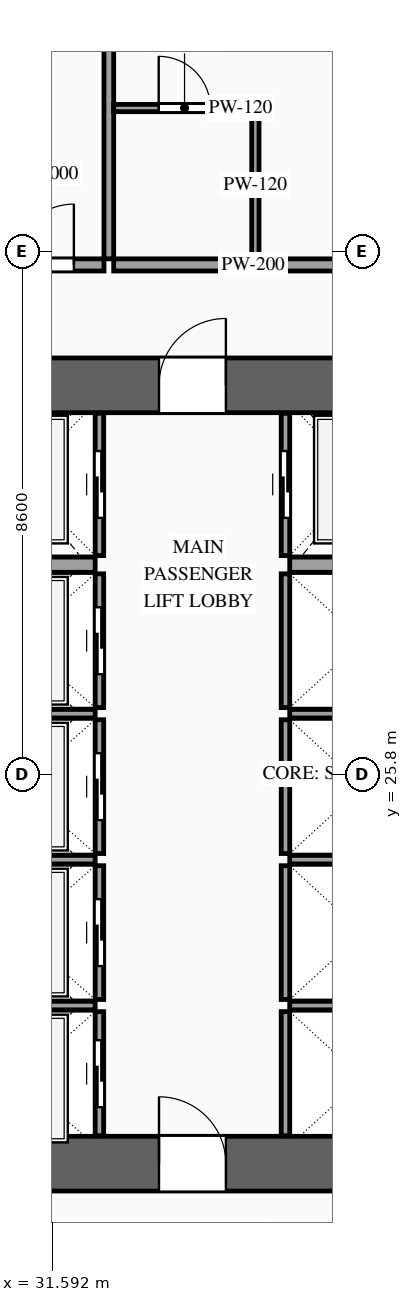
"""IFC4 building model, lengths in metres.
Left out: names, types, materials, properties, quantities, classifications, styles, units other than length and angle.
Written with IfcOpenShell. Run it as: python <this file> out.ifc"""

import sys

from ifc_helpers import new_model, si_unit, direction, frame, frame_2d, origin, place, context, subcontext, project, spatial, rectangle, extrude, source, transform, mapped, element, fill, save


model = new_model("IFC4")
c1 = context("Model", 3, precision=1e-05, world=origin(), true_north=direction((0.0, 1.0)))
c2 = subcontext(c1, "Body", "Model", "MODEL_VIEW")
j1 = project(units=[si_unit("LENGTHUNIT", "METRE"), si_unit("PLANEANGLEUNIT", "RADIAN")], contexts=[c1])
p1 = place(None, origin())
s1 = spatial("IfcSite", under=j1, at=p1, CompositionType="ELEMENT")
p2 = place(p1, origin())
s2 = spatial("IfcBuilding", under=s1, at=p2, CompositionType="ELEMENT")
p3 = place(p2, frame((0.0, 0.0, 53.2)))
s3 = spatial("IfcBuildingStorey", under=s2, at=p3, CompositionType="ELEMENT", Elevation=53.2)
p4 = place(p3, frame((23.35, 19.4, 0.0), z_axis=(0.0, 0.0, 1.0), x_axis=(1.0, 0.0, 0.0)))
e1 = element("IfcWall", 1, at=p4, inside=s3, PredefinedType="SHEAR", context=c2, shape_type="SweptSolid", body=[
    extrude(rectangle(XDim=27.3, YDim=0.9, at=frame_2d((13.65, 0.0))), origin(), (0.0, 0.0, 1.0), 3.6),
])
p5 = place(p4, frame((2.1, 0.0, 0.0)))
e2 = element("IfcOpeningElement", 2, at=p5, cuts=e1, PredefinedType="OPENING", context=c2, shape_type="SweptSolid", body=[
    extrude(rectangle(XDim=1.1, YDim=2.2, at=frame_2d((0.55, 1.1))), frame((0.0, 0.465, 0.0), z_axis=(0.0, -1.0, 0.0), x_axis=(1.0, 0.0, 0.0)), (0.0, 0.0, 1.0), 0.93),
])
p6 = place(p4, frame((10.0, 0.0, 0.0)))
e3 = element("IfcOpeningElement", 3, at=p6, cuts=e1, PredefinedType="OPENING", context=c2, shape_type="SweptSolid", body=[
    extrude(rectangle(XDim=1.1, YDim=2.2, at=frame_2d((0.55, 1.1))), frame((0.0, 0.465, 0.0), z_axis=(0.0, -1.0, 0.0), x_axis=(1.0, 0.0, 0.0)), (0.0, 0.0, 1.0), 0.93),
])
p7 = place(p4, frame((23.2, 0.0, 0.0)))
e4 = element("IfcOpeningElement", 4, at=p7, cuts=e1, PredefinedType="OPENING", context=c2, shape_type="SweptSolid", body=[
    extrude(rectangle(XDim=1.1, YDim=2.2, at=frame_2d((0.55, 1.1))), frame((0.0, 0.465, 0.0), z_axis=(0.0, -1.0, 0.0), x_axis=(1.0, 0.0, 0.0)), (0.0, 0.0, 1.0), 0.93),
])
p8 = place(p4, frame((19.82, 0.0, 0.0)))
e5 = element("IfcOpeningElement", 5, at=p8, cuts=e1, PredefinedType="OPENING", context=c2, shape_type="SweptSolid", body=[
    extrude(rectangle(XDim=0.9, YDim=2.15, at=frame_2d((0.45, 1.075))), frame((0.0, 0.465, 0.0), z_axis=(0.0, -1.0, 0.0), x_axis=(1.0, 0.0, 0.0)), (0.0, 0.0, 1.0), 0.93),
])
p9 = place(p4, frame((18.38, 0.0, 0.0)))
e6 = element("IfcOpeningElement", 6, at=p9, cuts=e1, PredefinedType="OPENING", context=c2, shape_type="SweptSolid", body=[
    extrude(rectangle(XDim=0.9, YDim=2.15, at=frame_2d((0.45, 1.075))), frame((0.0, 0.465, 0.0), z_axis=(0.0, -1.0, 0.0), x_axis=(1.0, 0.0, 0.0)), (0.0, 0.0, 1.0), 0.93),
])
p10 = place(p3, frame((23.35, 32.2, 0.0), z_axis=(0.0, 0.0, 1.0), x_axis=(1.0, 0.0, 0.0)))
e7 = element("IfcWall", 7, at=p10, inside=s3, PredefinedType="SHEAR", context=c2, shape_type="SweptSolid", body=[
    extrude(rectangle(XDim=27.3, YDim=0.9, at=frame_2d((13.65, 0.0))), origin(), (0.0, 0.0, 1.0), 3.6),
])
p11 = place(p10, frame((4.72, 0.0, 0.0)))
e8 = element("IfcOpeningElement", 8, at=p11, cuts=e7, PredefinedType="OPENING", context=c2, shape_type="SweptSolid", body=[
    extrude(rectangle(XDim=0.9, YDim=2.15, at=frame_2d((0.45, 1.075))), frame((0.0, 0.465, 0.0), z_axis=(0.0, -1.0, 0.0), x_axis=(1.0, 0.0, 0.0)), (0.0, 0.0, 1.0), 0.93),
])
p12 = place(p10, frame((10.0, 0.0, 0.0)))
e9 = element("IfcOpeningElement", 9, at=p12, cuts=e7, PredefinedType="OPENING", context=c2, shape_type="SweptSolid", body=[
    extrude(rectangle(XDim=1.1, YDim=2.2, at=frame_2d((0.55, 1.1))), frame((0.0, 0.465, 0.0), z_axis=(0.0, -1.0, 0.0), x_axis=(1.0, 0.0, 0.0)), (0.0, 0.0, 1.0), 0.93),
])
p13 = place(p10, frame((15.85, 0.0, 0.0)))
e10 = element("IfcOpeningElement", 10, at=p13, cuts=e7, PredefinedType="OPENING", context=c2, shape_type="SweptSolid", body=[
    extrude(rectangle(XDim=1.1, YDim=2.2, at=frame_2d((0.55, 1.1))), frame((0.0, 0.465, 0.0), z_axis=(0.0, -1.0, 0.0), x_axis=(1.0, 0.0, 0.0)), (0.0, 0.0, 1.0), 0.93),
])
p14 = place(p10, frame((19.05, 0.0, 0.0)))
e11 = element("IfcOpeningElement", 11, at=p14, cuts=e7, PredefinedType="OPENING", context=c2, shape_type="SweptSolid", body=[
    extrude(rectangle(XDim=0.9, YDim=2.15, at=frame_2d((0.45, 1.075))), frame((0.0, 0.465, 0.0), z_axis=(0.0, -1.0, 0.0), x_axis=(1.0, 0.0, 0.0)), (0.0, 0.0, 1.0), 0.93),
])
p15 = place(p3, frame((32.37, 19.86, 0.0), z_axis=(0.0, 0.0, 1.0), x_axis=(0.0, 1.0, 0.0)))
e12 = element("IfcWall", 12, at=p15, inside=s3, PredefinedType="SOLIDWALL", context=c2, shape_type="SweptSolid", body=[
    extrude(rectangle(XDim=2.04, YDim=0.14, at=frame_2d((1.02, 0.0))), origin(), (0.0, 0.0, 1.0), 3.38),
])
p16 = place(p15, frame((0.47, 0.0, 0.0)))
e13 = element("IfcOpeningElement", 13, at=p16, cuts=e12, PredefinedType="OPENING", context=c2, shape_type="SweptSolid", body=[
    extrude(rectangle(XDim=1.1, YDim=2.2, at=frame_2d((0.55, 1.1))), frame((0.0, 0.085, 0.0), z_axis=(0.0, -1.0, 0.0), x_axis=(1.0, 0.0, 0.0)), (0.0, 0.0, 1.0), 0.17),
])
m1 = source(origin(), c2, "Body", "SweptSolid", [
    extrude(rectangle(XDim=2.5, YDim=0.14, at=frame_2d((1.25, 0.0))), origin(), (0.0, 0.0, 1.0), 3.38),
])
p17 = place(p3, frame((29.8, 22.0, 0.0), z_axis=(0.0, 0.0, 1.0), x_axis=(1.0, 0.0, 0.0)))
e14 = element("IfcWall", 14, at=p17, inside=s3, PredefinedType="SOLIDWALL", context=c2, shape_type="MappedRepresentation", body=[
    mapped(m1, transform((0.0, 0.0, 0.0), scale=1.0)),
])
p18 = place(p3, frame((32.37, 22.1, 0.0), z_axis=(0.0, 0.0, 1.0), x_axis=(0.0, 1.0, 0.0)))
e15 = element("IfcWall", 15, at=p18, inside=s3, PredefinedType="SOLIDWALL", context=c2, shape_type="SweptSolid", body=[
    extrude(rectangle(XDim=2.2, YDim=0.14, at=frame_2d((1.1, 0.0))), origin(), (0.0, 0.0, 1.0), 3.38),
])
p19 = place(p18, frame((0.55, 0.0, 0.0)))
e16 = element("IfcOpeningElement", 16, at=p19, cuts=e15, PredefinedType="OPENING", context=c2, shape_type="SweptSolid", body=[
    extrude(rectangle(XDim=1.1, YDim=2.2, at=frame_2d((0.55, 1.1))), frame((0.0, 0.085, 0.0), z_axis=(0.0, -1.0, 0.0), x_axis=(1.0, 0.0, 0.0)), (0.0, 0.0, 1.0), 0.17),
])
p20 = place(p3, frame((29.8, 24.4, 0.0), z_axis=(0.0, 0.0, 1.0), x_axis=(1.0, 0.0, 0.0)))
e17 = element("IfcWall", 17, at=p20, inside=s3, PredefinedType="SOLIDWALL", context=c2, shape_type="MappedRepresentation", body=[
    mapped(m1, transform((0.0, 0.0, 0.0), scale=1.0)),
])
p21 = place(p3, frame((32.37, 24.5, 0.0), z_axis=(0.0, 0.0, 1.0), x_axis=(0.0, 1.0, 0.0)))
e18 = element("IfcWall", 18, at=p21, inside=s3, PredefinedType="SOLIDWALL", context=c2, shape_type="SweptSolid", body=[
    extrude(rectangle(XDim=2.2, YDim=0.14, at=frame_2d((1.1, 0.0))), origin(), (0.0, 0.0, 1.0), 3.38),
])
p22 = place(p21, frame((0.55, 0.0, 0.0)))
e19 = element("IfcOpeningElement", 19, at=p22, cuts=e18, PredefinedType="OPENING", context=c2, shape_type="SweptSolid", body=[
    extrude(rectangle(XDim=1.1, YDim=2.2, at=frame_2d((0.55, 1.1))), frame((0.0, 0.085, 0.0), z_axis=(0.0, -1.0, 0.0), x_axis=(1.0, 0.0, 0.0)), (0.0, 0.0, 1.0), 0.17),
])
p23 = place(p3, frame((29.8, 26.8, 0.0), z_axis=(0.0, 0.0, 1.0), x_axis=(1.0, 0.0, 0.0)))
e20 = element("IfcWall", 20, at=p23, inside=s3, PredefinedType="SOLIDWALL", context=c2, shape_type="MappedRepresentation", body=[
    mapped(m1, transform((0.0, 0.0, 0.0), scale=1.0)),
])
p24 = place(p3, frame((32.37, 26.9, 0.0), z_axis=(0.0, 0.0, 1.0), x_axis=(0.0, 1.0, 0.0)))
e21 = element("IfcWall", 21, at=p24, inside=s3, PredefinedType="SOLIDWALL", context=c2, shape_type="SweptSolid", body=[
    extrude(rectangle(XDim=2.2, YDim=0.14, at=frame_2d((1.1, 0.0))), origin(), (0.0, 0.0, 1.0), 3.38),
])
p25 = place(p24, frame((0.55, 0.0, 0.0)))
e22 = element("IfcOpeningElement", 22, at=p25, cuts=e21, PredefinedType="OPENING", context=c2, shape_type="SweptSolid", body=[
    extrude(rectangle(XDim=1.1, YDim=2.2, at=frame_2d((0.55, 1.1))), frame((0.0, 0.085, 0.0), z_axis=(0.0, -1.0, 0.0), x_axis=(1.0, 0.0, 0.0)), (0.0, 0.0, 1.0), 0.17),
])
p26 = place(p3, frame((32.37, 29.4, 0.0), z_axis=(0.0, 0.0, 1.0), x_axis=(0.0, 1.0, 0.0)))
e23 = element("IfcWall", 23, at=p26, inside=s3, PredefinedType="SOLIDWALL", context=c2, shape_type="SweptSolid", body=[
    extrude(rectangle(XDim=2.34, YDim=0.14, at=frame_2d((1.17, 0.0))), origin(), (0.0, 0.0, 1.0), 3.38),
])
p27 = place(p26, frame((0.62, 0.0, 0.0)))
e24 = element("IfcOpeningElement", 24, at=p27, cuts=e23, PredefinedType="OPENING", context=c2, shape_type="SweptSolid", body=[
    extrude(rectangle(XDim=1.1, YDim=2.2, at=frame_2d((0.55, 1.1))), frame((0.0, 0.085, 0.0), z_axis=(0.0, -1.0, 0.0), x_axis=(1.0, 0.0, 0.0)), (0.0, 0.0, 1.0), 0.17),
])
m2 = source(origin(), c2, "Body", "SweptSolid", [
    extrude(rectangle(XDim=2.5, YDim=0.25, at=frame_2d((1.25, 0.0))), origin(), (0.0, 0.0, 1.0), 3.38),
])
p28 = place(p3, frame((29.8, 29.25, 0.0), z_axis=(0.0, 0.0, 1.0), x_axis=(1.0, 0.0, 0.0)))
e25 = element("IfcWall", 25, at=p28, inside=s3, PredefinedType="SOLIDWALL", context=c2, shape_type="MappedRepresentation", body=[
    mapped(m2, transform((0.0, 0.0, 0.0), scale=1.0)),
])
m3 = source(origin(), c2, "Body", "SweptSolid", [
    extrude(rectangle(XDim=2.04, YDim=0.14, at=frame_2d((1.02, 0.0))), origin(), (0.0, 0.0, 1.0), 3.38),
])
p29 = place(p3, frame((35.43, 19.86, 0.0), z_axis=(0.0, 0.0, 1.0), x_axis=(0.0, 1.0, 0.0)))
e26 = element("IfcWall", 26, at=p29, inside=s3, PredefinedType="SOLIDWALL", context=c2, shape_type="MappedRepresentation", body=[
    mapped(m3, transform((0.0, 0.0, 0.0), scale=1.0)),
])
m4 = source(origin(), c2, "Body", "SweptSolid", [
    extrude(rectangle(XDim=2.4, YDim=0.14, at=frame_2d((1.2, 0.0))), origin(), (0.0, 0.0, 1.0), 3.38),
])
p30 = place(p3, frame((35.5, 22.0, 0.0), z_axis=(0.0, 0.0, 1.0), x_axis=(1.0, 0.0, 0.0)))
e27 = element("IfcWall", 27, at=p30, inside=s3, PredefinedType="SOLIDWALL", context=c2, shape_type="MappedRepresentation", body=[
    mapped(m4, transform((0.0, 0.0, 0.0), scale=1.0)),
])
m5 = source(origin(), c2, "Body", "SweptSolid", [
    extrude(rectangle(XDim=2.2, YDim=0.14, at=frame_2d((1.1, 0.0))), origin(), (0.0, 0.0, 1.0), 3.38),
])
p31 = place(p3, frame((35.43, 22.1, 0.0), z_axis=(0.0, 0.0, 1.0), x_axis=(0.0, 1.0, 0.0)))
e28 = element("IfcWall", 28, at=p31, inside=s3, PredefinedType="SOLIDWALL", context=c2, shape_type="MappedRepresentation", body=[
    mapped(m5, transform((0.0, 0.0, 0.0), scale=1.0)),
])
p32 = place(p3, frame((35.5, 24.4, 0.0), z_axis=(0.0, 0.0, 1.0), x_axis=(1.0, 0.0, 0.0)))
e29 = element("IfcWall", 29, at=p32, inside=s3, PredefinedType="SOLIDWALL", context=c2, shape_type="MappedRepresentation", body=[
    mapped(m4, transform((0.0, 0.0, 0.0), scale=1.0)),
])
p33 = place(p3, frame((35.43, 24.5, 0.0), z_axis=(0.0, 0.0, 1.0), x_axis=(0.0, 1.0, 0.0)))
e30 = element("IfcWall", 30, at=p33, inside=s3, PredefinedType="SOLIDWALL", context=c2, shape_type="MappedRepresentation", body=[
    mapped(m5, transform((0.0, 0.0, 0.0), scale=1.0)),
])
p34 = place(p3, frame((35.5, 26.8, 0.0), z_axis=(0.0, 0.0, 1.0), x_axis=(1.0, 0.0, 0.0)))
e31 = element("IfcWall", 31, at=p34, inside=s3, PredefinedType="SOLIDWALL", context=c2, shape_type="MappedRepresentation", body=[
    mapped(m4, transform((0.0, 0.0, 0.0), scale=1.0)),
])
m6 = source(origin(), c2, "Body", "SweptSolid", [
    extrude(rectangle(XDim=2.2, YDim=0.14, at=frame_2d((1.1, 0.0))), origin(), (0.0, 0.0, 1.0), 3.38),
])
p35 = place(p3, frame((35.43, 26.9, 0.0), z_axis=(0.0, 0.0, 1.0), x_axis=(0.0, 1.0, 0.0)))
e32 = element("IfcWall", 32, at=p35, inside=s3, PredefinedType="SOLIDWALL", context=c2, shape_type="MappedRepresentation", body=[
    mapped(m6, transform((0.0, 0.0, 0.0), scale=1.0)),
])
p36 = place(p3, frame((35.43, 29.4, 0.0), z_axis=(0.0, 0.0, 1.0), x_axis=(0.0, 1.0, 0.0)))
e33 = element("IfcWall", 33, at=p36, inside=s3, PredefinedType="SOLIDWALL", context=c2, shape_type="SweptSolid", body=[
    extrude(rectangle(XDim=2.34, YDim=0.14, at=frame_2d((1.17, 0.0))), origin(), (0.0, 0.0, 1.0), 3.38),
])
p37 = place(p36, frame((0.62, 0.0, 0.0)))
e34 = element("IfcOpeningElement", 34, at=p37, cuts=e33, PredefinedType="OPENING", context=c2, shape_type="SweptSolid", body=[
    extrude(rectangle(XDim=1.1, YDim=2.2, at=frame_2d((0.55, 1.1))), frame((0.0, 0.085, 0.0), z_axis=(0.0, -1.0, 0.0), x_axis=(1.0, 0.0, 0.0)), (0.0, 0.0, 1.0), 0.17),
])
m7 = source(origin(), c2, "Body", "SweptSolid", [
    extrude(rectangle(XDim=2.4, YDim=0.25, at=frame_2d((1.2, 0.0))), origin(), (0.0, 0.0, 1.0), 3.38),
])
p38 = place(p3, frame((35.5, 29.25, 0.0), z_axis=(0.0, 0.0, 1.0), x_axis=(1.0, 0.0, 0.0)))
e35 = element("IfcWall", 35, at=p38, inside=s3, PredefinedType="SOLIDWALL", context=c2, shape_type="MappedRepresentation", body=[
    mapped(m7, transform((0.0, 0.0, 0.0), scale=1.0)),
])
p39 = place(p3, frame((28.42, 34.18, 0.0), z_axis=(0.0, 0.0, 1.0), x_axis=(1.0, 0.0, 0.0)))
e36 = element("IfcWall", 36, at=p39, inside=s3, PredefinedType="PARTITIONING", context=c2, shape_type="SweptSolid", body=[
    extrude(rectangle(XDim=4.025, YDim=0.2, at=frame_2d((2.013, 0.0))), origin(), (0.0, 0.0, 1.0), 3.38),
])
p40 = place(p39, frame((2.53, 0.0, 0.0)))
e37 = element("IfcOpeningElement", 37, at=p40, cuts=e36, PredefinedType="OPENING", context=c2, shape_type="SweptSolid", body=[
    extrude(rectangle(XDim=1.0, YDim=2.2, at=frame_2d((0.5, 1.1))), frame((0.0, 0.115, 0.0), z_axis=(0.0, -1.0, 0.0), x_axis=(1.0, 0.0, 0.0)), (0.0, 0.0, 1.0), 0.23),
])
m8 = source(origin(), c2, "Body", "SweptSolid", [
    extrude(rectangle(XDim=16.47, YDim=0.16, at=frame_2d((8.235, 0.0))), origin(), (0.0, 0.0, 1.0), 3.38),
])
p41 = place(p3, frame((32.525, 34.28, 0.0), z_axis=(0.0, 0.0, 1.0), x_axis=(0.0, 1.0, 0.0)))
e38 = element("IfcWall", 38, at=p41, inside=s3, PredefinedType="PARTITIONING", context=c2, shape_type="MappedRepresentation", body=[
    mapped(m8, transform((0.0, 0.0, 0.0), scale=1.0)),
])
p42 = place(p3, frame((32.605, 34.18, 0.0), z_axis=(0.0, 0.0, 1.0), x_axis=(1.0, 0.0, 0.0)))
e39 = element("IfcWall", 39, at=p42, inside=s3, PredefinedType="PARTITIONING", context=c2, shape_type="SweptSolid", body=[
    extrude(rectangle(XDim=8.261, YDim=0.2, at=frame_2d((4.13, 0.0))), origin(), (0.0, 0.0, 1.0), 3.38),
])
p43 = place(p42, frame((4.836, 0.0, 0.0)))
e40 = element("IfcOpeningElement", 40, at=p43, cuts=e39, PredefinedType="OPENING", context=c2, shape_type="SweptSolid", body=[
    extrude(rectangle(XDim=1.0, YDim=2.2, at=frame_2d((0.5, 1.1))), frame((0.0, 0.115, 0.0), z_axis=(0.0, -1.0, 0.0), x_axis=(1.0, 0.0, 0.0)), (0.0, 0.0, 1.0), 0.23),
])
p44 = place(p3, frame((32.605, 36.76, 0.0), z_axis=(0.0, 0.0, 1.0), x_axis=(1.0, 0.0, 0.0)))
e41 = element("IfcWall", 41, at=p44, inside=s3, PredefinedType="PARTITIONING", context=c2, shape_type="SweptSolid", body=[
    extrude(rectangle(XDim=2.33, YDim=0.12, at=frame_2d((1.165, 0.0))), origin(), (0.0, 0.0, 1.0), 3.38),
])
p45 = place(p44, frame((0.74, 0.0, 0.0)))
e42 = element("IfcOpeningElement", 42, at=p45, cuts=e41, PredefinedType="OPENING", context=c2, shape_type="SweptSolid", body=[
    extrude(rectangle(XDim=0.85, YDim=2.1, at=frame_2d((0.425, 1.05))), frame((0.0, 0.075, 0.0), z_axis=(0.0, -1.0, 0.0), x_axis=(1.0, 0.0, 0.0)), (0.0, 0.0, 1.0), 0.15),
])
m9 = source(origin(), c2, "Body", "SweptSolid", [
    extrude(rectangle(XDim=2.42, YDim=0.12, at=frame_2d((1.21, 0.0))), origin(), (0.0, 0.0, 1.0), 3.38),
])
p46 = place(p3, frame((34.935, 34.28, 0.0), z_axis=(0.0, 0.0, 1.0), x_axis=(0.0, 1.0, 0.0)))
e43 = element("IfcWall", 43, at=p46, inside=s3, PredefinedType="PARTITIONING", context=c2, shape_type="MappedRepresentation", body=[
    mapped(m9, transform((0.0, 0.0, 0.0), scale=1.0)),
])
m10 = source(origin(), c2, "Body", "SweptSolid", [
    extrude(rectangle(XDim=1.1, YDim=2.2, at=frame_2d((0.55, 1.1))), frame((0.0, 0.025, 0.0), z_axis=(0.0, -1.0, 0.0), x_axis=(1.0, 0.0, 0.0)), (0.0, 0.0, 1.0), 0.05),
])
p47 = place(p16, origin())
e44 = element("IfcDoor", 44, at=p47, inside=s3, OperationType="SLIDING_TO_LEFT", PredefinedType="DOOR", context=c2, shape_type="MappedRepresentation", body=[
    mapped(m10, transform((0.0, 0.0, 0.0), scale=1.0)),
])
fill(e13, e44)
p48 = place(p19, origin())
e45 = element("IfcDoor", 45, at=p48, inside=s3, OperationType="SLIDING_TO_RIGHT", PredefinedType="DOOR", context=c2, shape_type="MappedRepresentation", body=[
    mapped(m10, transform((0.0, 0.0, 0.0), scale=1.0)),
])
fill(e16, e45)
p49 = place(p22, origin())
e46 = element("IfcDoor", 46, at=p49, inside=s3, OperationType="SLIDING_TO_LEFT", PredefinedType="DOOR", context=c2, shape_type="MappedRepresentation", body=[
    mapped(m10, transform((0.0, 0.0, 0.0), scale=1.0)),
])
fill(e19, e46)
p50 = place(p25, origin())
e47 = element("IfcDoor", 47, at=p50, inside=s3, OperationType="SLIDING_TO_RIGHT", PredefinedType="DOOR", context=c2, shape_type="MappedRepresentation", body=[
    mapped(m10, transform((0.0, 0.0, 0.0), scale=1.0)),
])
fill(e22, e47)
p51 = place(p27, origin())
e48 = element("IfcDoor", 48, at=p51, inside=s3, OperationType="SLIDING_TO_LEFT", PredefinedType="DOOR", context=c2, shape_type="MappedRepresentation", body=[
    mapped(m10, transform((0.0, 0.0, 0.0), scale=1.0)),
])
fill(e24, e48)
p52 = place(p37, origin())
e49 = element("IfcDoor", 49, at=p52, inside=s3, OperationType="SLIDING_TO_RIGHT", PredefinedType="DOOR", context=c2, shape_type="MappedRepresentation", body=[
    mapped(m10, transform((0.0, 0.0, 0.0), scale=1.0)),
])
fill(e34, e49)
m11 = source(origin(), c2, "Body", "SweptSolid", [
    extrude(rectangle(XDim=1.1, YDim=2.2, at=frame_2d((0.55, 1.1))), frame((0.0, 0.025, 0.0), z_axis=(0.0, -1.0, 0.0), x_axis=(1.0, 0.0, 0.0)), (0.0, 0.0, 1.0), 0.05),
])
p53 = place(p6, origin())
e50 = element("IfcDoor", 50, at=p53, inside=s3, OperationType="SINGLE_SWING_LEFT", PredefinedType="DOOR", context=c2, shape_type="MappedRepresentation", body=[
    mapped(m11, transform((0.0, 0.0, 0.0), scale=1.0)),
])
fill(e3, e50)
p54 = place(p12, origin())
e51 = element("IfcDoor", 51, at=p54, inside=s3, OperationType="SINGLE_SWING_RIGHT", PredefinedType="DOOR", context=c2, shape_type="MappedRepresentation", body=[
    mapped(m11, transform((0.0, 0.0, 0.0), scale=1.0)),
])
fill(e9, e51)
m12 = source(origin(), c2, "Body", "SweptSolid", [
    extrude(rectangle(XDim=1.0, YDim=2.2, at=frame_2d((0.5, 1.1))), frame((0.0, 0.025, 0.0), z_axis=(0.0, -1.0, 0.0), x_axis=(1.0, 0.0, 0.0)), (0.0, 0.0, 1.0), 0.05),
])
p55 = place(p40, origin())
e52 = element("IfcDoor", 52, at=p55, inside=s3, OperationType="SINGLE_SWING_RIGHT", PredefinedType="DOOR", context=c2, shape_type="MappedRepresentation", body=[
    mapped(m12, transform((0.0, 0.0, 0.0), scale=1.0)),
])
fill(e37, e52)
m13 = source(origin(), c2, "Body", "SweptSolid", [
    extrude(rectangle(XDim=0.85, YDim=2.1, at=frame_2d((0.425, 1.05))), frame((0.0, 0.025, 0.0), z_axis=(0.0, -1.0, 0.0), x_axis=(1.0, 0.0, 0.0)), (0.0, 0.0, 1.0), 0.05),
])
p56 = place(p45, origin())
e53 = element("IfcDoor", 53, at=p56, inside=s3, OperationType="SINGLE_SWING_LEFT", PredefinedType="DOOR", context=c2, shape_type="MappedRepresentation", body=[
    mapped(m13, transform((0.0, 0.0, 0.0), scale=1.0)),
])
fill(e42, e53)
save(model, sys.argv[1])
